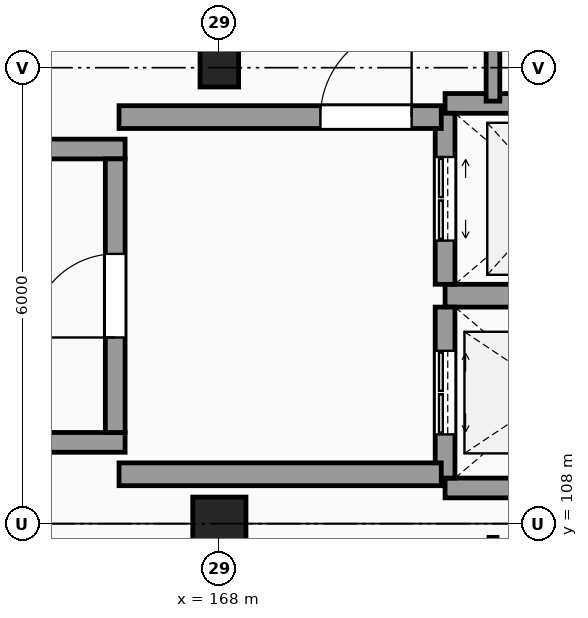
"""IFC4 building model, lengths in metres.
Left out: names, types, materials, properties, quantities, classifications, styles, units other than length and angle.
Written with IfcOpenShell. Run it as: python <this file> out.ifc"""

import sys

from ifc_helpers import new_model, si_unit, direction, frame, frame_2d, origin, origin_2d, place, context, subcontext, project, spatial, rectangle, circle, hollow_circle, extrude, element, fill, save


model = new_model("IFC4")
c1 = context("Model", 3, precision=1e-05, world=origin(), true_north=direction((0.0, 1.0)))
c2 = subcontext(c1, "Body", "Model", "MODEL_VIEW")
j1 = project(units=[si_unit("LENGTHUNIT", "METRE"), si_unit("PLANEANGLEUNIT", "RADIAN")], contexts=[c1])
p1 = place(None, origin())
s1 = spatial("IfcSite", under=j1, at=p1, CompositionType="ELEMENT")
p2 = place(p1, origin())
s2 = spatial("IfcBuilding", under=s1, at=p2, CompositionType="ELEMENT")
p3 = place(p2, frame((0.0, 0.0, 19.8)))
s3 = spatial("IfcBuildingStorey", under=s2, at=p3, CompositionType="ELEMENT", Elevation=19.8)
p4 = place(p3, frame((168.0, 108.0, 0.0), z_axis=(0.0, 0.0, 1.0), x_axis=(1.0, 0.0, 0.0)))
e1 = element("IfcColumn", 1, at=p4, inside=s3, PredefinedType="COLUMN", context=c2, shape_type="SweptSolid", body=[
    extrude(circle(Radius=0.35, at=origin_2d()), origin(), (0.0, 0.0, 1.0), 4.8),
])
p5 = place(p3, frame((168.0, 114.0, 0.0), z_axis=(0.0, 0.0, 1.0), x_axis=(1.0, 0.0, 0.0)))
e2 = element("IfcColumn", 2, at=p5, inside=s3, PredefinedType="COLUMN", context=c2, shape_type="SweptSolid", body=[
    extrude(hollow_circle(Radius=0.254, WallThickness=0.025, at=origin_2d()), origin(), (0.0, 0.0, 1.0), 4.8),
])
for number, where, z_axis, x_axis in (
    (3, (156.04, 109.07, 0.0), (0.0, 0.0, 1.0), (1.0, 0.0, 0.0)),
    (4, (156.04, 112.93, 0.0), (0.0, 0.0, 1.0), (1.0, 0.0, 0.0)),
):
    element("IfcWall", number, at=place(p3, frame(where, z_axis=z_axis, x_axis=x_axis)), inside=s3, PredefinedType="SHEAR", context=c2, shape_type="SweptSolid", body=[
        extrude(rectangle(XDim=10.72, YDim=0.26, at=frame_2d((5.36, 0.0))), origin(), (0.0, 0.0, 1.0), 4.8),
    ])
p6 = place(p3, frame((166.63, 109.2, 0.0), z_axis=(0.0, 0.0, 1.0), x_axis=(0.0, 1.0, 0.0)))
e5 = element("IfcWall", 5, at=p6, inside=s3, PredefinedType="SHEAR", context=c2, shape_type="SweptSolid", body=[
    extrude(rectangle(XDim=3.6, YDim=0.26, at=frame_2d((1.8, 0.0))), origin(), (0.0, 0.0, 1.0), 4.8),
])
p7 = place(p6, frame((1.25, 0.0, 0.0)))
e6 = element("IfcOpeningElement", 6, at=p7, cuts=e5, PredefinedType="OPENING", context=c2, shape_type="SweptSolid", body=[
    extrude(rectangle(XDim=1.1, YDim=2.15, at=frame_2d((0.55, 1.075))), frame((0.0, 0.14, 0.0), z_axis=(0.0, -1.0, 0.0), x_axis=(1.0, 0.0, 0.0)), (0.0, 0.0, 1.0), 0.28),
])
p8 = place(p3, frame((170.97, 108.47, 0.0), z_axis=(0.0, 0.0, 1.0), x_axis=(1.0, 0.0, 0.0)))
e7 = element("IfcWall", 7, at=p8, inside=s3, PredefinedType="SHEAR", context=c2, shape_type="SweptSolid", body=[
    extrude(rectangle(XDim=2.91, YDim=0.26, at=frame_2d((1.455, 0.0))), origin(), (0.0, 0.0, 1.0), 4.8),
])
p9 = place(p3, frame((170.97, 111.0, 0.0), z_axis=(0.0, 0.0, 1.0), x_axis=(1.0, 0.0, 0.0)))
e8 = element("IfcWall", 8, at=p9, inside=s3, PredefinedType="SHEAR", context=c2, shape_type="SweptSolid", body=[
    extrude(rectangle(XDim=2.91, YDim=0.3, at=frame_2d((1.455, 0.0))), origin(), (0.0, 0.0, 1.0), 4.8),
])
p10 = place(p3, frame((170.97, 108.6, 0.0), z_axis=(0.0, 0.0, 1.0), x_axis=(0.0, 1.0, 0.0)))
e9 = element("IfcWall", 9, at=p10, inside=s3, PredefinedType="SHEAR", context=c2, shape_type="SweptSolid", body=[
    extrude(rectangle(XDim=2.25, YDim=0.26, at=frame_2d((1.125, 0.0))), origin(), (0.0, 0.0, 1.0), 4.8),
])
p11 = place(p10, frame((0.575, 0.0, 0.0)))
e10 = element("IfcOpeningElement", 10, at=p11, cuts=e9, PredefinedType="OPENING", context=c2, shape_type="SweptSolid", body=[
    extrude(rectangle(XDim=1.1, YDim=2.2, at=frame_2d((0.55, 1.1))), frame((0.0, 0.14, 0.0), z_axis=(0.0, -1.0, 0.0), x_axis=(1.0, 0.0, 0.0)), (0.0, 0.0, 1.0), 0.28),
])
p12 = place(p3, frame((170.97, 113.53, 0.0), z_axis=(0.0, 0.0, 1.0), x_axis=(1.0, 0.0, 0.0)))
e11 = element("IfcWall", 11, at=p12, inside=s3, PredefinedType="SHEAR", context=c2, shape_type="SweptSolid", body=[
    extrude(rectangle(XDim=2.91, YDim=0.26, at=frame_2d((1.455, 0.0))), origin(), (0.0, 0.0, 1.0), 4.8),
])
p13 = place(p3, frame((170.97, 111.15, 0.0), z_axis=(0.0, 0.0, 1.0), x_axis=(0.0, 1.0, 0.0)))
e12 = element("IfcWall", 12, at=p13, inside=s3, PredefinedType="SHEAR", context=c2, shape_type="SweptSolid", body=[
    extrude(rectangle(XDim=2.25, YDim=0.26, at=frame_2d((1.125, 0.0))), origin(), (0.0, 0.0, 1.0), 4.8),
])
p14 = place(p13, frame((0.575, 0.0, 0.0)))
e13 = element("IfcOpeningElement", 13, at=p14, cuts=e12, PredefinedType="OPENING", context=c2, shape_type="SweptSolid", body=[
    extrude(rectangle(XDim=1.1, YDim=2.2, at=frame_2d((0.55, 1.1))), frame((0.0, 0.14, 0.0), z_axis=(0.0, -1.0, 0.0), x_axis=(1.0, 0.0, 0.0)), (0.0, 0.0, 1.0), 0.28),
])
p15 = place(p3, frame((166.68, 113.35, 0.0), z_axis=(0.0, 0.0, 1.0), x_axis=(1.0, 0.0, 0.0)))
e14 = element("IfcWall", 14, at=p15, inside=s3, PredefinedType="SHEAR", context=c2, shape_type="SweptSolid", body=[
    extrude(rectangle(XDim=4.24, YDim=0.3, at=frame_2d((2.12, 0.0))), origin(), (0.0, 0.0, 1.0), 4.8),
])
p16 = place(p15, frame((2.65, 0.0, 0.0)))
e15 = element("IfcOpeningElement", 15, at=p16, cuts=e14, PredefinedType="OPENING", context=c2, shape_type="SweptSolid", body=[
    extrude(rectangle(XDim=1.2, YDim=2.2, at=frame_2d((0.6, 1.1))), frame((0.0, 0.16, 0.0), z_axis=(0.0, -1.0, 0.0), x_axis=(1.0, 0.0, 0.0)), (0.0, 0.0, 1.0), 0.32),
])
p17 = place(p3, frame((166.68, 108.65, 0.0), z_axis=(0.0, 0.0, 1.0), x_axis=(1.0, 0.0, 0.0)))
e16 = element("IfcWall", 16, at=p17, inside=s3, PredefinedType="SHEAR", context=c2, shape_type="SweptSolid", body=[
    extrude(rectangle(XDim=4.24, YDim=0.3, at=frame_2d((2.12, 0.0))), origin(), (0.0, 0.0, 1.0), 4.8),
])
p18 = place(p3, frame((171.6, 60.0, 0.0), z_axis=(0.0, 0.0, 1.0), x_axis=(0.0, 1.0, 0.0)))
e17 = element("IfcWall", 17, at=p18, inside=s3, PredefinedType="PARTITIONING", context=c2, shape_type="SweptSolid", body=[
    extrude(rectangle(XDim=47.82, YDim=0.105, at=frame_2d((23.91, 0.0))), origin(), (0.0, 0.0, 1.0), 4.55),
])
p19 = place(p18, frame((8.45, 0.0, 0.0)))
e18 = element("IfcOpeningElement", 18, at=p19, cuts=e17, PredefinedType="OPENING", context=c2, shape_type="SweptSolid", body=[
    extrude(rectangle(XDim=1.1, YDim=2.15, at=frame_2d((0.55, 1.075))), frame((0.0, 0.062, 0.0), z_axis=(0.0, -1.0, 0.0), x_axis=(1.0, 0.0, 0.0)), (0.0, 0.0, 1.0), 0.125),
])
p20 = place(p3, frame((171.6, 113.56, 0.0), z_axis=(0.0, 0.0, 1.0), x_axis=(0.0, 1.0, 0.0)))
e19 = element("IfcWall", 19, at=p20, inside=s3, PredefinedType="PARTITIONING", context=c2, shape_type="SweptSolid", body=[
    extrude(rectangle(XDim=3.94, YDim=0.18, at=frame_2d((1.97, 0.0))), origin(), (0.0, 0.0, 1.0), 4.55),
])
p21 = place(p7, origin())
e20 = element("IfcDoor", 20, at=p21, inside=s3, OperationType="SINGLE_SWING_LEFT", PredefinedType="DOOR", context=c2, shape_type="SweptSolid", body=[
    extrude(rectangle(XDim=1.1, YDim=2.15, at=frame_2d((0.55, 1.075))), frame((0.0, 0.025, 0.0), z_axis=(0.0, -1.0, 0.0), x_axis=(1.0, 0.0, 0.0)), (0.0, 0.0, 1.0), 0.05),
])
fill(e6, e20)
p22 = place(p11, origin())
e21 = element("IfcDoor", 21, at=p22, inside=s3, OperationType="DOUBLE_DOOR_SLIDING", PredefinedType="DOOR", context=c2, shape_type="SweptSolid", body=[
    extrude(rectangle(XDim=1.1, YDim=2.2, at=frame_2d((0.55, 1.1))), frame((0.0, 0.025, 0.0), z_axis=(0.0, -1.0, 0.0), x_axis=(1.0, 0.0, 0.0)), (0.0, 0.0, 1.0), 0.05),
])
fill(e10, e21)
p23 = place(p14, origin())
e22 = element("IfcDoor", 22, at=p23, inside=s3, OperationType="DOUBLE_DOOR_SLIDING", PredefinedType="DOOR", context=c2, shape_type="SweptSolid", body=[
    extrude(rectangle(XDim=1.1, YDim=2.2, at=frame_2d((0.55, 1.1))), frame((0.0, 0.025, 0.0), z_axis=(0.0, -1.0, 0.0), x_axis=(1.0, 0.0, 0.0)), (0.0, 0.0, 1.0), 0.05),
])
fill(e13, e22)
p24 = place(p16, origin())
e23 = element("IfcDoor", 23, at=p24, inside=s3, OperationType="SINGLE_SWING_RIGHT", PredefinedType="DOOR", context=c2, shape_type="SweptSolid", body=[
    extrude(rectangle(XDim=1.2, YDim=2.2, at=frame_2d((0.6, 1.1))), frame((0.0, 0.025, 0.0), z_axis=(0.0, -1.0, 0.0), x_axis=(1.0, 0.0, 0.0)), (0.0, 0.0, 1.0), 0.05),
])
fill(e15, e23)
save(model, sys.argv[1])
